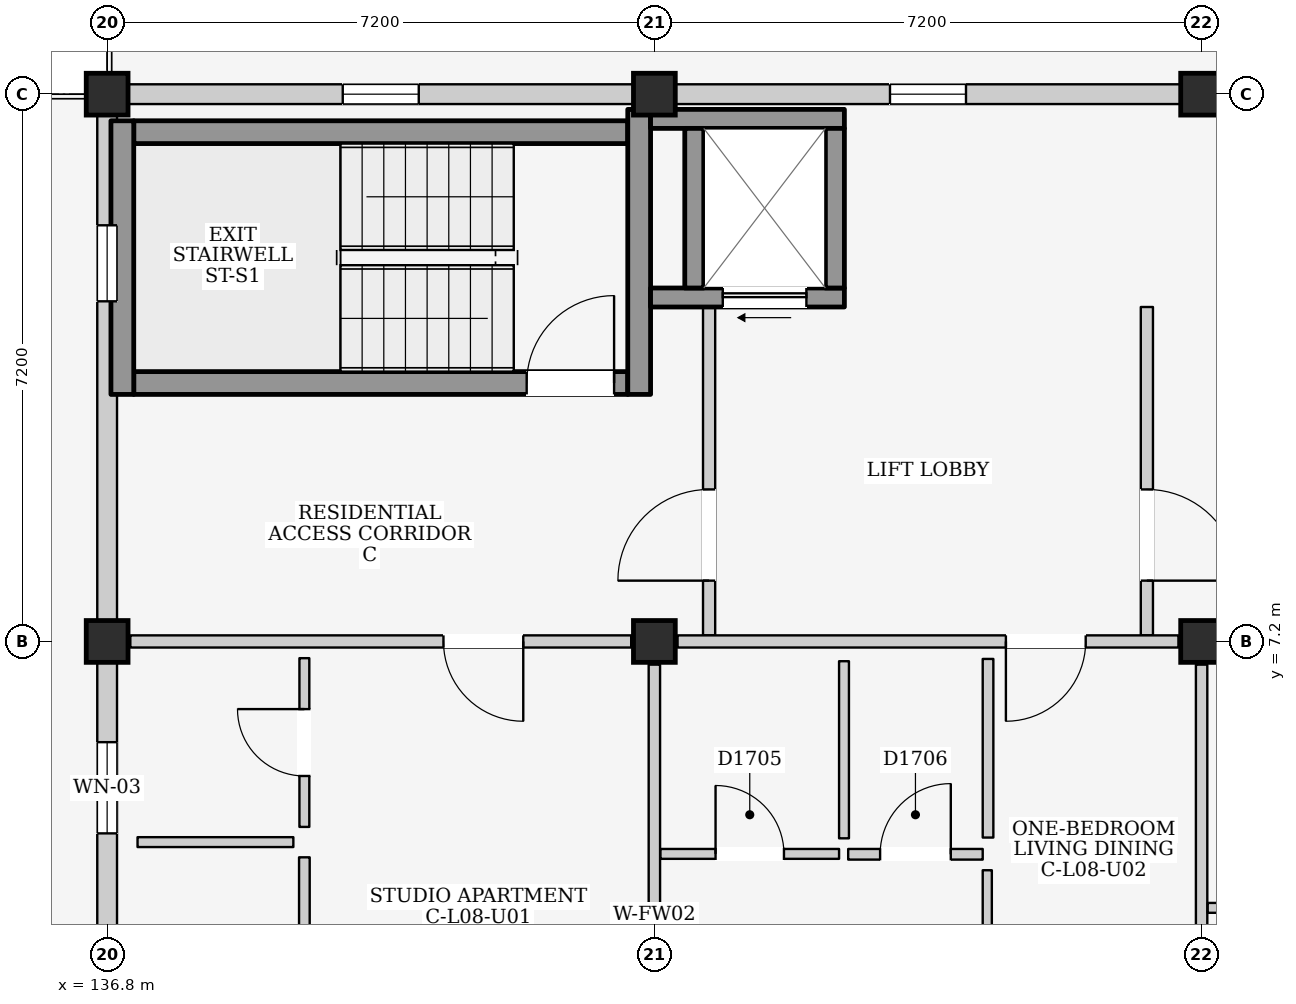
"""IFC4 building model, lengths in metres.
Left out: names, types, materials, properties, quantities, classifications, styles, units other than length and angle.
Written with IfcOpenShell. Run it as: python <this file> out.ifc"""

import sys

from ifc_helpers import new_model, si_unit, direction, frame, frame_2d, origin, origin_2d, place, context, subcontext, project, spatial, rectangle, extrude, element, fill, save


model = new_model("IFC4")
c1 = context("Model", 3, precision=1e-05, world=origin(), true_north=direction((0.0, 1.0)))
c2 = subcontext(c1, "Body", "Model", "MODEL_VIEW")
j1 = project(units=[si_unit("LENGTHUNIT", "METRE"), si_unit("PLANEANGLEUNIT", "RADIAN")], contexts=[c1])
p1 = place(None, origin())
s1 = spatial("IfcSite", under=j1, at=p1, CompositionType="ELEMENT")
p2 = place(p1, origin())
s2 = spatial("IfcBuilding", under=s1, at=p2, CompositionType="ELEMENT")
p3 = place(p2, frame((0.0, 0.0, 28.3)))
s3 = spatial("IfcBuildingStorey", under=s2, at=p3, CompositionType="ELEMENT", Elevation=28.3)
for number, where, z_axis, x_axis in (
    (1, (136.8, 7.2, 0.0), (0.0, 0.0, 1.0), (1.0, 0.0, 0.0)),
    (2, (136.8, 14.4, 0.0), (0.0, 0.0, 1.0), (1.0, 0.0, 0.0)),
    (3, (144.0, 7.2, 0.0), (0.0, 0.0, 1.0), (1.0, 0.0, 0.0)),
    (4, (144.0, 14.4, 0.0), (0.0, 0.0, 1.0), (1.0, 0.0, 0.0)),
    (5, (151.2, 7.2, 0.0), (0.0, 0.0, 1.0), (1.0, 0.0, 0.0)),
    (6, (151.2, 14.4, 0.0), (0.0, 0.0, 1.0), (1.0, 0.0, 0.0)),
):
    element("IfcColumn", number, at=place(p3, frame(where, z_axis=z_axis, x_axis=x_axis)), inside=s3, PredefinedType="COLUMN", context=c2, shape_type="SweptSolid", body=[
        extrude(rectangle(XDim=0.55, YDim=0.55, at=origin_2d()), origin(), (0.0, 0.0, 1.0), 3.2),
    ])
p4 = place(p3, frame((136.8, 0.275, 0.0), z_axis=(0.0, 0.0, 1.0), x_axis=(0.0, 1.0, 0.0)))
e7 = element("IfcWall", 7, at=p4, inside=s3, PredefinedType="ELEMENTEDWALL", context=c2, shape_type="SweptSolid", body=[
    extrude(rectangle(XDim=6.65, YDim=0.26, at=frame_2d((3.325, 0.0))), origin(), (0.0, 0.0, 1.0), 2.435),
])
p5 = place(p4, frame((1.4, 0.0, 0.0)))
e8 = element("IfcOpeningElement", 8, at=p5, cuts=e7, PredefinedType="OPENING", context=c2, shape_type="SweptSolid", body=[
    extrude(rectangle(XDim=1.08, YDim=2.12, at=frame_2d((0.54, 1.06))), frame((0.0, 0.145, 0.0), z_axis=(0.0, -1.0, 0.0), x_axis=(1.0, 0.0, 0.0)), (0.0, 0.0, 1.0), 0.29),
])
p6 = place(p4, frame((4.4, 0.0, 0.95)))
e9 = element("IfcOpeningElement", 9, at=p6, cuts=e7, PredefinedType="OPENING", context=c2, shape_type="SweptSolid", body=[
    extrude(rectangle(XDim=1.2, YDim=1.35, at=frame_2d((0.6, 0.675))), frame((0.0, 0.145, 0.0), z_axis=(0.0, -1.0, 0.0), x_axis=(1.0, 0.0, 0.0)), (0.0, 0.0, 1.0), 0.29),
])
p7 = place(p3, frame((137.075, 14.4, 0.0), z_axis=(0.0, 0.0, 1.0), x_axis=(1.0, 0.0, 0.0)))
e10 = element("IfcWall", 10, at=p7, inside=s3, PredefinedType="ELEMENTEDWALL", context=c2, shape_type="SweptSolid", body=[
    extrude(rectangle(XDim=6.65, YDim=0.26, at=frame_2d((3.325, 0.0))), origin(), (0.0, 0.0, 1.0), 2.335),
])
p8 = place(p7, frame((2.825, 0.0, 1.2)))
e11 = element("IfcOpeningElement", 11, at=p8, cuts=e10, PredefinedType="OPENING", context=c2, shape_type="SweptSolid", body=[
    extrude(rectangle(XDim=1.0, YDim=0.9, at=frame_2d((0.5, 0.45))), frame((0.0, 0.145, 0.0), z_axis=(0.0, -1.0, 0.0), x_axis=(1.0, 0.0, 0.0)), (0.0, 0.0, 1.0), 0.29),
])
p9 = place(p3, frame((136.8, 7.475, 0.0), z_axis=(0.0, 0.0, 1.0), x_axis=(0.0, 1.0, 0.0)))
e12 = element("IfcWall", 12, at=p9, inside=s3, PredefinedType="ELEMENTEDWALL", context=c2, shape_type="SweptSolid", body=[
    extrude(rectangle(XDim=6.65, YDim=0.26, at=frame_2d((3.325, 0.0))), origin(), (0.0, 0.0, 1.0), 2.435),
])
p10 = place(p9, frame((4.2, 0.0, 1.2)))
e13 = element("IfcOpeningElement", 13, at=p10, cuts=e12, PredefinedType="OPENING", context=c2, shape_type="SweptSolid", body=[
    extrude(rectangle(XDim=1.0, YDim=0.9, at=frame_2d((0.5, 0.45))), frame((0.0, 0.145, 0.0), z_axis=(0.0, -1.0, 0.0), x_axis=(1.0, 0.0, 0.0)), (0.0, 0.0, 1.0), 0.29),
])
p11 = place(p3, frame((144.275, 14.4, 0.0), z_axis=(0.0, 0.0, 1.0), x_axis=(1.0, 0.0, 0.0)))
e14 = element("IfcWall", 14, at=p11, inside=s3, PredefinedType="ELEMENTEDWALL", context=c2, shape_type="SweptSolid", body=[
    extrude(rectangle(XDim=6.65, YDim=0.26, at=frame_2d((3.325, 0.0))), origin(), (0.0, 0.0, 1.0), 2.335),
])
p12 = place(p11, frame((2.825, 0.0, 1.2)))
e15 = element("IfcOpeningElement", 15, at=p12, cuts=e14, PredefinedType="OPENING", context=c2, shape_type="SweptSolid", body=[
    extrude(rectangle(XDim=1.0, YDim=0.9, at=frame_2d((0.5, 0.45))), frame((0.0, 0.145, 0.0), z_axis=(0.0, -1.0, 0.0), x_axis=(1.0, 0.0, 0.0)), (0.0, 0.0, 1.0), 0.29),
])
p13 = place(p3, frame((137.15, 10.6, 0.0), z_axis=(0.0, 0.0, 1.0), x_axis=(1.0, 0.0, 0.0)))
e16 = element("IfcWall", 16, at=p13, inside=s3, PredefinedType="SHEAR", context=c2, shape_type="SweptSolid", body=[
    extrude(rectangle(XDim=6.5, YDim=0.3, at=frame_2d((3.25, 0.0))), origin(), (0.0, 0.0, 1.0), 2.95),
])
p14 = place(p13, frame((5.17, 0.0, 0.0)))
e17 = element("IfcOpeningElement", 17, at=p14, cuts=e16, PredefinedType="OPENING", context=c2, shape_type="SweptSolid", body=[
    extrude(rectangle(XDim=1.15, YDim=2.2, at=frame_2d((0.575, 1.1))), frame((0.0, 0.165, 0.0), z_axis=(0.0, -1.0, 0.0), x_axis=(1.0, 0.0, 0.0)), (0.0, 0.0, 1.0), 0.33),
])
p15 = place(p3, frame((137.15, 13.9, 0.0), z_axis=(0.0, 0.0, 1.0), x_axis=(1.0, 0.0, 0.0)))
e18 = element("IfcWall", 18, at=p15, inside=s3, PredefinedType="SHEAR", context=c2, shape_type="SweptSolid", body=[
    extrude(rectangle(XDim=6.5, YDim=0.3, at=frame_2d((3.25, 0.0))), origin(), (0.0, 0.0, 1.0), 2.95),
])
p16 = place(p3, frame((137.0, 10.45, 0.0), z_axis=(0.0, 0.0, 1.0), x_axis=(0.0, 1.0, 0.0)))
e19 = element("IfcWall", 19, at=p16, inside=s3, PredefinedType="SHEAR", context=c2, shape_type="SweptSolid", body=[
    extrude(rectangle(XDim=3.6, YDim=0.3, at=frame_2d((1.8, 0.0))), origin(), (0.0, 0.0, 1.0), 2.95),
])
p17 = place(p3, frame((143.8, 10.45, 0.0), z_axis=(0.0, 0.0, 1.0), x_axis=(0.0, 1.0, 0.0)))
e20 = element("IfcWall", 20, at=p17, inside=s3, PredefinedType="SHEAR", context=c2, shape_type="SweptSolid", body=[
    extrude(rectangle(XDim=3.75, YDim=0.3, at=frame_2d((1.875, 0.0))), origin(), (0.0, 0.0, 1.0), 2.95),
])
p18 = place(p3, frame((144.72, 7.28, 0.0), z_axis=(0.0, 0.0, 1.0), x_axis=(0.0, 1.0, 0.0)))
e21 = element("IfcWall", 21, at=p18, inside=s3, PredefinedType="PARTITIONING", context=c2, shape_type="SweptSolid", body=[
    extrude(rectangle(XDim=4.32, YDim=0.16, at=frame_2d((2.16, 0.0))), origin(), (0.0, 0.0, 1.0), 2.95),
])
p19 = place(p18, frame((0.72, 0.0, 0.0)))
e22 = element("IfcOpeningElement", 22, at=p19, cuts=e21, PredefinedType="OPENING", context=c2, shape_type="SweptSolid", body=[
    extrude(rectangle(XDim=1.2, YDim=2.2, at=frame_2d((0.6, 1.1))), frame((0.0, 0.095, 0.0), z_axis=(0.0, -1.0, 0.0), x_axis=(1.0, 0.0, 0.0)), (0.0, 0.0, 1.0), 0.19),
])
p20 = place(p3, frame((150.48, 7.28, 0.0), z_axis=(0.0, 0.0, 1.0), x_axis=(0.0, 1.0, 0.0)))
e23 = element("IfcWall", 23, at=p20, inside=s3, PredefinedType="PARTITIONING", context=c2, shape_type="SweptSolid", body=[
    extrude(rectangle(XDim=4.32, YDim=0.16, at=frame_2d((2.16, 0.0))), origin(), (0.0, 0.0, 1.0), 2.95),
])
p21 = place(p20, frame((0.72, 0.0, 0.0)))
e24 = element("IfcOpeningElement", 24, at=p21, cuts=e23, PredefinedType="OPENING", context=c2, shape_type="SweptSolid", body=[
    extrude(rectangle(XDim=1.2, YDim=2.2, at=frame_2d((0.6, 1.1))), frame((0.0, 0.095, 0.0), z_axis=(0.0, -1.0, 0.0), x_axis=(1.0, 0.0, 0.0)), (0.0, 0.0, 1.0), 0.19),
])
p22 = place(p3, frame((143.95, 11.725, 0.0), z_axis=(0.0, 0.0, 1.0), x_axis=(1.0, 0.0, 0.0)))
e25 = element("IfcWall", 25, at=p22, inside=s3, PredefinedType="SHEAR", context=c2, shape_type="SweptSolid", body=[
    extrude(rectangle(XDim=2.55, YDim=0.25, at=frame_2d((1.275, 0.0))), origin(), (0.0, 0.0, 1.0), 2.95),
])
p23 = place(p22, frame((0.95, 0.0, 0.0)))
e26 = element("IfcOpeningElement", 26, at=p23, cuts=e25, PredefinedType="OPENING", context=c2, shape_type="SweptSolid", body=[
    extrude(rectangle(XDim=1.1, YDim=2.15, at=frame_2d((0.55, 1.075))), frame((0.0, 0.14, 0.0), z_axis=(0.0, -1.0, 0.0), x_axis=(1.0, 0.0, 0.0)), (0.0, 0.0, 1.0), 0.28),
])
p24 = place(p3, frame((143.95, 14.075, 0.0), z_axis=(0.0, 0.0, 1.0), x_axis=(1.0, 0.0, 0.0)))
e27 = element("IfcWall", 27, at=p24, inside=s3, PredefinedType="SHEAR", context=c2, shape_type="SweptSolid", body=[
    extrude(rectangle(XDim=2.55, YDim=0.25, at=frame_2d((1.275, 0.0))), origin(), (0.0, 0.0, 1.0), 2.95),
])
for number, where, z_axis, x_axis in (
    (28, (144.525, 11.85, 0.0), (0.0, 0.0, 1.0), (0.0, 1.0, 0.0)),
    (29, (146.375, 11.85, 0.0), (0.0, 0.0, 1.0), (0.0, 1.0, 0.0)),
):
    element("IfcWall", number, at=place(p3, frame(where, z_axis=z_axis, x_axis=x_axis)), inside=s3, PredefinedType="SHEAR", context=c2, shape_type="SweptSolid", body=[
        extrude(rectangle(XDim=2.1, YDim=0.25, at=frame_2d((1.05, 0.0))), origin(), (0.0, 0.0, 1.0), 2.95),
    ])
p25 = place(p3, frame((137.105, 7.2, 0.0), z_axis=(0.0, 0.0, 1.0), x_axis=(1.0, 0.0, 0.0)))
e30 = element("IfcWall", 30, at=p25, inside=s3, PredefinedType="PARTITIONING", context=c2, shape_type="SweptSolid", body=[
    extrude(rectangle(XDim=6.59, YDim=0.16, at=frame_2d((3.295, 0.0))), origin(), (0.0, 0.0, 1.0), 2.335),
])
p26 = place(p25, frame((4.12, 0.0, 0.0)))
e31 = element("IfcOpeningElement", 31, at=p26, cuts=e30, PredefinedType="OPENING", context=c2, shape_type="SweptSolid", body=[
    extrude(rectangle(XDim=1.05, YDim=2.15, at=frame_2d((0.525, 1.075))), frame((0.0, 0.095, 0.0), z_axis=(0.0, -1.0, 0.0), x_axis=(1.0, 0.0, 0.0)), (0.0, 0.0, 1.0), 0.19),
])
p27 = place(p3, frame((144.0, 0.305, 0.0), z_axis=(0.0, 0.0, 1.0), x_axis=(0.0, 1.0, 0.0)))
e32 = element("IfcWall", 32, at=p27, inside=s3, PredefinedType="PARTITIONING", context=c2, shape_type="SweptSolid", body=[
    extrude(rectangle(XDim=6.59, YDim=0.15, at=frame_2d((3.295, 0.0))), origin(), (0.0, 0.0, 1.0), 2.435),
])
p28 = place(p3, frame((137.2, 4.56, 0.0), z_axis=(0.0, 0.0, 1.0), x_axis=(1.0, 0.0, 0.0)))
e33 = element("IfcWall", 33, at=p28, inside=s3, PredefinedType="PARTITIONING", context=c2, shape_type="SweptSolid", body=[
    extrude(rectangle(XDim=2.05, YDim=0.13, at=frame_2d((1.025, 0.0))), origin(), (0.0, 0.0, 1.0), 2.95),
])
p29 = place(p3, frame((139.395, 4.76, 0.0), z_axis=(0.0, 0.0, 1.0), x_axis=(0.0, 1.0, 0.0)))
e34 = element("IfcWall", 34, at=p29, inside=s3, PredefinedType="PARTITIONING", context=c2, shape_type="SweptSolid", body=[
    extrude(rectangle(XDim=2.22, YDim=0.13, at=frame_2d((1.11, 0.0))), origin(), (0.0, 0.0, 1.0), 2.95),
])
p30 = place(p29, frame((0.67, 0.0, 0.0)))
e35 = element("IfcOpeningElement", 35, at=p30, cuts=e34, PredefinedType="OPENING", context=c2, shape_type="SweptSolid", body=[
    extrude(rectangle(XDim=0.88, YDim=2.1, at=frame_2d((0.44, 1.05))), frame((0.0, 0.08, 0.0), z_axis=(0.0, -1.0, 0.0), x_axis=(1.0, 0.0, 0.0)), (0.0, 0.0, 1.0), 0.16),
])
p31 = place(p3, frame((139.395, 0.42, 0.0), z_axis=(0.0, 0.0, 1.0), x_axis=(0.0, 1.0, 0.0)))
e36 = element("IfcWall", 36, at=p31, inside=s3, PredefinedType="PARTITIONING", context=c2, shape_type="SweptSolid", body=[
    extrude(rectangle(XDim=3.94, YDim=0.14, at=frame_2d((1.97, 0.0))), origin(), (0.0, 0.0, 1.0), 2.95),
])
p32 = place(p31, frame((1.505, 0.0, 0.0)))
e37 = element("IfcOpeningElement", 37, at=p32, cuts=e36, PredefinedType="OPENING", context=c2, shape_type="SweptSolid", body=[
    extrude(rectangle(XDim=0.93, YDim=2.14, at=frame_2d((0.465, 1.07))), frame((0.0, 0.085, 0.0), z_axis=(0.0, -1.0, 0.0), x_axis=(1.0, 0.0, 0.0)), (0.0, 0.0, 1.0), 0.17),
])
p33 = place(p3, frame((144.305, 7.2, 0.0), z_axis=(0.0, 0.0, 1.0), x_axis=(1.0, 0.0, 0.0)))
e38 = element("IfcWall", 38, at=p33, inside=s3, PredefinedType="PARTITIONING", context=c2, shape_type="SweptSolid", body=[
    extrude(rectangle(XDim=6.59, YDim=0.16, at=frame_2d((3.295, 0.0))), origin(), (0.0, 0.0, 1.0), 2.335),
])
p34 = place(p33, frame((4.32, 0.0, 0.0)))
e39 = element("IfcOpeningElement", 39, at=p34, cuts=e38, PredefinedType="OPENING", context=c2, shape_type="SweptSolid", body=[
    extrude(rectangle(XDim=1.05, YDim=2.15, at=frame_2d((0.525, 1.075))), frame((0.0, 0.095, 0.0), z_axis=(0.0, -1.0, 0.0), x_axis=(1.0, 0.0, 0.0)), (0.0, 0.0, 1.0), 0.19),
])
p35 = place(p3, frame((151.2, 0.305, 0.0), z_axis=(0.0, 0.0, 1.0), x_axis=(0.0, 1.0, 0.0)))
e40 = element("IfcWall", 40, at=p35, inside=s3, PredefinedType="PARTITIONING", context=c2, shape_type="SweptSolid", body=[
    extrude(rectangle(XDim=6.59, YDim=0.15, at=frame_2d((3.295, 0.0))), origin(), (0.0, 0.0, 1.0), 2.435),
])
p36 = place(p3, frame((144.08, 4.405, 0.0), z_axis=(0.0, 0.0, 1.0), x_axis=(1.0, 0.0, 0.0)))
e41 = element("IfcWall", 41, at=p36, inside=s3, PredefinedType="PARTITIONING", context=c2, shape_type="SweptSolid", body=[
    extrude(rectangle(XDim=2.35, YDim=0.13, at=frame_2d((1.175, 0.0))), origin(), (0.0, 0.0, 1.0), 2.95),
])
p37 = place(p36, frame((0.725, 0.0, 0.0)))
e42 = element("IfcOpeningElement", 42, at=p37, cuts=e41, PredefinedType="OPENING", context=c2, shape_type="SweptSolid", body=[
    extrude(rectangle(XDim=0.9, YDim=2.1, at=frame_2d((0.45, 1.05))), frame((0.0, 0.08, 0.0), z_axis=(0.0, -1.0, 0.0), x_axis=(1.0, 0.0, 0.0)), (0.0, 0.0, 1.0), 0.16),
])
p38 = place(p3, frame((146.495, 4.61, 0.0), z_axis=(0.0, 0.0, 1.0), x_axis=(0.0, 1.0, 0.0)))
e43 = element("IfcWall", 43, at=p38, inside=s3, PredefinedType="PARTITIONING", context=c2, shape_type="SweptSolid", body=[
    extrude(rectangle(XDim=2.33, YDim=0.13, at=frame_2d((1.165, 0.0))), origin(), (0.0, 0.0, 1.0), 2.95),
])
p39 = place(p3, frame((146.55, 4.4, 0.0), z_axis=(0.0, 0.0, 1.0), x_axis=(1.0, 0.0, 0.0)))
e44 = element("IfcWall", 44, at=p39, inside=s3, PredefinedType="PARTITIONING", context=c2, shape_type="SweptSolid", body=[
    extrude(rectangle(XDim=1.77, YDim=0.14, at=frame_2d((0.885, 0.0))), origin(), (0.0, 0.0, 1.0), 2.95),
])
p40 = place(p39, frame((0.42, 0.0, 0.0)))
e45 = element("IfcOpeningElement", 45, at=p40, cuts=e44, PredefinedType="OPENING", context=c2, shape_type="SweptSolid", body=[
    extrude(rectangle(XDim=0.93, YDim=2.14, at=frame_2d((0.465, 1.07))), frame((0.0, 0.085, 0.0), z_axis=(0.0, -1.0, 0.0), x_axis=(1.0, 0.0, 0.0)), (0.0, 0.0, 1.0), 0.17),
])
p41 = place(p3, frame((148.39, 4.62, 0.0), z_axis=(0.0, 0.0, 1.0), x_axis=(0.0, 1.0, 0.0)))
e46 = element("IfcWall", 46, at=p41, inside=s3, PredefinedType="PARTITIONING", context=c2, shape_type="SweptSolid", body=[
    extrude(rectangle(XDim=2.35, YDim=0.14, at=frame_2d((1.175, 0.0))), origin(), (0.0, 0.0, 1.0), 2.95),
])
p42 = place(p3, frame((148.38, 0.44, 0.0), z_axis=(0.0, 0.0, 1.0), x_axis=(0.0, 1.0, 0.0)))
e47 = element("IfcWall", 47, at=p42, inside=s3, PredefinedType="PARTITIONING", context=c2, shape_type="SweptSolid", body=[
    extrude(rectangle(XDim=3.75, YDim=0.12, at=frame_2d((1.875, 0.0))), origin(), (0.0, 0.0, 1.0), 2.95),
])
p43 = place(p42, frame((1.4, 0.0, 0.0)))
e48 = element("IfcOpeningElement", 48, at=p43, cuts=e47, PredefinedType="OPENING", context=c2, shape_type="SweptSolid", body=[
    extrude(rectangle(XDim=0.95, YDim=2.15, at=frame_2d((0.475, 1.075))), frame((0.0, 0.075, 0.0), z_axis=(0.0, -1.0, 0.0), x_axis=(1.0, 0.0, 0.0)), (0.0, 0.0, 1.0), 0.15),
])
p44 = place(p3, frame((151.28, 3.695, 0.0), z_axis=(0.0, 0.0, 1.0), x_axis=(1.0, 0.0, 0.0)))
e49 = element("IfcWall", 49, at=p44, inside=s3, PredefinedType="PARTITIONING", context=c2, shape_type="SweptSolid", body=[
    extrude(rectangle(XDim=2.4, YDim=0.13, at=frame_2d((1.2, 0.0))), origin(), (0.0, 0.0, 1.0), 2.95),
])
p45 = place(p44, frame((0.75, 0.0, 0.0)))
e50 = element("IfcOpeningElement", 50, at=p45, cuts=e49, PredefinedType="OPENING", context=c2, shape_type="SweptSolid", body=[
    extrude(rectangle(XDim=0.9, YDim=2.1, at=frame_2d((0.45, 1.05))), frame((0.0, 0.08, 0.0), z_axis=(0.0, -1.0, 0.0), x_axis=(1.0, 0.0, 0.0)), (0.0, 0.0, 1.0), 0.16),
])
p46 = place(p6, origin())
e51 = element("IfcWindow", 51, at=p46, inside=s3, PartitioningType="SINGLE_PANEL", PredefinedType="WINDOW", context=c2, shape_type="SweptSolid", body=[
    extrude(rectangle(XDim=1.2, YDim=1.35, at=frame_2d((0.6, 0.675))), frame((0.0, 0.03, 0.0), z_axis=(0.0, -1.0, 0.0), x_axis=(1.0, 0.0, 0.0)), (0.0, 0.0, 1.0), 0.06),
])
fill(e9, e51)
p47 = place(p8, origin())
e52 = element("IfcWindow", 52, at=p47, inside=s3, PartitioningType="SINGLE_PANEL", PredefinedType="WINDOW", context=c2, shape_type="SweptSolid", body=[
    extrude(rectangle(XDim=1.0, YDim=0.9, at=frame_2d((0.5, 0.45))), frame((0.0, 0.03, 0.0), z_axis=(0.0, -1.0, 0.0), x_axis=(1.0, 0.0, 0.0)), (0.0, 0.0, 1.0), 0.06),
])
fill(e11, e52)
p48 = place(p10, origin())
e53 = element("IfcWindow", 53, at=p48, inside=s3, PartitioningType="SINGLE_PANEL", PredefinedType="WINDOW", context=c2, shape_type="SweptSolid", body=[
    extrude(rectangle(XDim=1.0, YDim=0.9, at=frame_2d((0.5, 0.45))), frame((0.0, 0.03, 0.0), z_axis=(0.0, -1.0, 0.0), x_axis=(1.0, 0.0, 0.0)), (0.0, 0.0, 1.0), 0.06),
])
fill(e13, e53)
p49 = place(p12, origin())
e54 = element("IfcWindow", 54, at=p49, inside=s3, PartitioningType="SINGLE_PANEL", PredefinedType="WINDOW", context=c2, shape_type="SweptSolid", body=[
    extrude(rectangle(XDim=1.0, YDim=0.9, at=frame_2d((0.5, 0.45))), frame((0.0, 0.03, 0.0), z_axis=(0.0, -1.0, 0.0), x_axis=(1.0, 0.0, 0.0)), (0.0, 0.0, 1.0), 0.06),
])
fill(e15, e54)
p50 = place(p14, origin())
e55 = element("IfcDoor", 55, at=p50, inside=s3, OperationType="SINGLE_SWING_RIGHT", PredefinedType="DOOR", context=c2, shape_type="SweptSolid", body=[
    extrude(rectangle(XDim=1.15, YDim=2.2, at=frame_2d((0.575, 1.1))), frame((0.0, 0.025, 0.0), z_axis=(0.0, -1.0, 0.0), x_axis=(1.0, 0.0, 0.0)), (0.0, 0.0, 1.0), 0.05),
])
fill(e17, e55)
p51 = place(p19, origin())
e56 = element("IfcDoor", 56, at=p51, inside=s3, OperationType="SINGLE_SWING_LEFT", PredefinedType="DOOR", context=c2, shape_type="SweptSolid", body=[
    extrude(rectangle(XDim=1.2, YDim=2.2, at=frame_2d((0.6, 1.1))), frame((0.0, 0.025, 0.0), z_axis=(0.0, -1.0, 0.0), x_axis=(1.0, 0.0, 0.0)), (0.0, 0.0, 1.0), 0.05),
])
fill(e22, e56)
p52 = place(p21, frame((1.2, 0.0, 0.0), z_axis=(0.0, 0.0, 1.0), x_axis=(-1.0, 0.0, 0.0)))
e57 = element("IfcDoor", 57, at=p52, inside=s3, OperationType="SINGLE_SWING_RIGHT", PredefinedType="DOOR", context=c2, shape_type="SweptSolid", body=[
    extrude(rectangle(XDim=1.2, YDim=2.2, at=frame_2d((0.6, 1.1))), frame((0.0, 0.025, 0.0), z_axis=(0.0, -1.0, 0.0), x_axis=(1.0, 0.0, 0.0)), (0.0, 0.0, 1.0), 0.05),
])
fill(e24, e57)
p53 = place(p23, frame((1.1, 0.0, 0.0), z_axis=(0.0, 0.0, 1.0), x_axis=(-1.0, 0.0, 0.0)))
e58 = element("IfcDoor", 58, at=p53, inside=s3, OperationType="SLIDING_TO_LEFT", PredefinedType="DOOR", context=c2, shape_type="SweptSolid", body=[
    extrude(rectangle(XDim=1.1, YDim=2.15, at=frame_2d((0.55, 1.075))), frame((0.0, 0.025, 0.0), z_axis=(0.0, -1.0, 0.0), x_axis=(1.0, 0.0, 0.0)), (0.0, 0.0, 1.0), 0.05),
])
fill(e26, e58)
p54 = place(p26, frame((1.05, 0.0, 0.0), z_axis=(0.0, 0.0, 1.0), x_axis=(-1.0, 0.0, 0.0)))
e59 = element("IfcDoor", 59, at=p54, inside=s3, OperationType="SINGLE_SWING_LEFT", PredefinedType="DOOR", context=c2, shape_type="SweptSolid", body=[
    extrude(rectangle(XDim=1.05, YDim=2.15, at=frame_2d((0.525, 1.075))), frame((0.0, 0.025, 0.0), z_axis=(0.0, -1.0, 0.0), x_axis=(1.0, 0.0, 0.0)), (0.0, 0.0, 1.0), 0.05),
])
fill(e31, e59)
p55 = place(p30, origin())
e60 = element("IfcDoor", 60, at=p55, inside=s3, OperationType="SINGLE_SWING_RIGHT", PredefinedType="DOOR", context=c2, shape_type="SweptSolid", body=[
    extrude(rectangle(XDim=0.88, YDim=2.1, at=frame_2d((0.44, 1.05))), frame((0.0, 0.025, 0.0), z_axis=(0.0, -1.0, 0.0), x_axis=(1.0, 0.0, 0.0)), (0.0, 0.0, 1.0), 0.05),
])
fill(e35, e60)
p56 = place(p34, frame((1.05, 0.0, 0.0), z_axis=(0.0, 0.0, 1.0), x_axis=(-1.0, 0.0, 0.0)))
e61 = element("IfcDoor", 61, at=p56, inside=s3, OperationType="SINGLE_SWING_RIGHT", PredefinedType="DOOR", context=c2, shape_type="SweptSolid", body=[
    extrude(rectangle(XDim=1.05, YDim=2.15, at=frame_2d((0.525, 1.075))), frame((0.0, 0.025, 0.0), z_axis=(0.0, -1.0, 0.0), x_axis=(1.0, 0.0, 0.0)), (0.0, 0.0, 1.0), 0.05),
])
fill(e39, e61)
p57 = place(p37, origin())
e62 = element("IfcDoor", 62, at=p57, inside=s3, OperationType="SINGLE_SWING_LEFT", PredefinedType="DOOR", context=c2, shape_type="SweptSolid", body=[
    extrude(rectangle(XDim=0.9, YDim=2.1, at=frame_2d((0.45, 1.05))), frame((0.0, 0.025, 0.0), z_axis=(0.0, -1.0, 0.0), x_axis=(1.0, 0.0, 0.0)), (0.0, 0.0, 1.0), 0.05),
])
fill(e42, e62)
p58 = place(p40, origin())
e63 = element("IfcDoor", 63, at=p58, inside=s3, OperationType="SINGLE_SWING_RIGHT", PredefinedType="DOOR", context=c2, shape_type="SweptSolid", body=[
    extrude(rectangle(XDim=0.93, YDim=2.14, at=frame_2d((0.465, 1.07))), frame((0.0, 0.025, 0.0), z_axis=(0.0, -1.0, 0.0), x_axis=(1.0, 0.0, 0.0)), (0.0, 0.0, 1.0), 0.05),
])
fill(e45, e63)
save(model, sys.argv[1])
